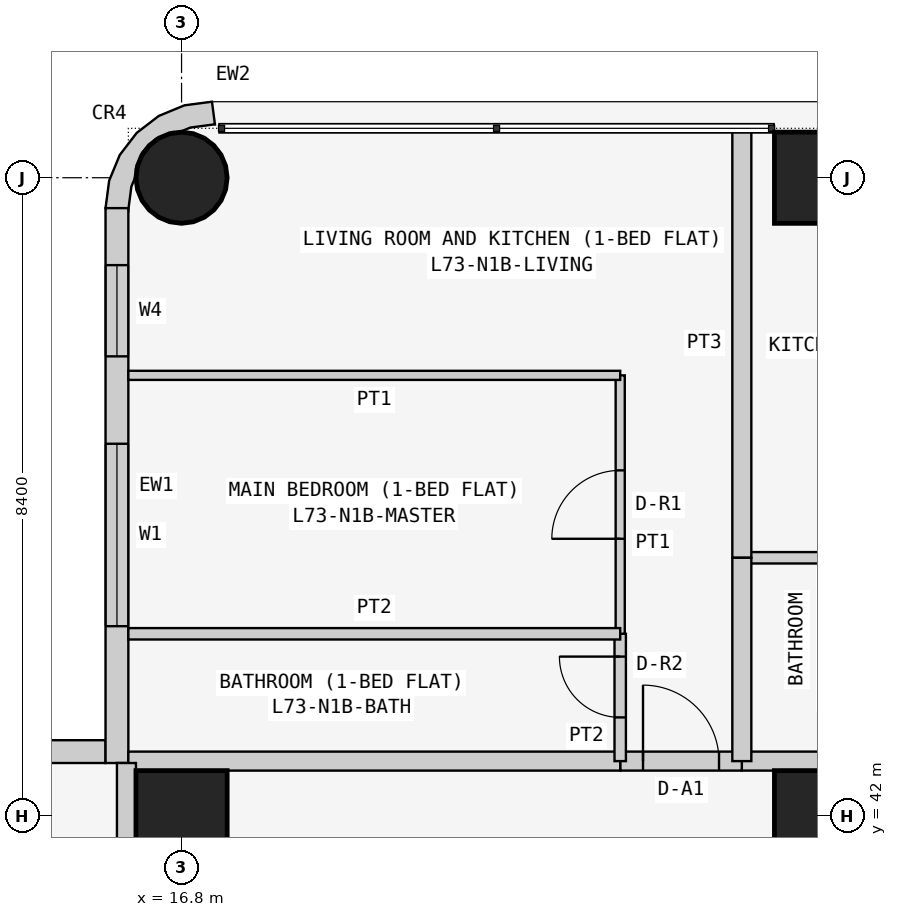
"""IFC4 building model, lengths in metres.
Left out: names, types, materials, properties, quantities, classifications, styles, units other than length and angle.
Written with IfcOpenShell. Run it as: python <this file> out.ifc"""

import sys

from ifc_helpers import new_model, si_unit, direction, frame, frame_2d, origin, origin_2d, place, context, subcontext, project, spatial, polyline, rectangle, circle, outline, extrude, element, fill, save


model = new_model("IFC4")
c1 = context("Model", 3, precision=1e-05, world=origin(), true_north=direction((0.0, 1.0)))
c2 = subcontext(c1, "Body", "Model", "MODEL_VIEW")
j1 = project(units=[si_unit("LENGTHUNIT", "METRE"), si_unit("PLANEANGLEUNIT", "RADIAN")], contexts=[c1])
p1 = place(None, origin())
s1 = spatial("IfcSite", under=j1, at=p1, CompositionType="ELEMENT")
p2 = place(p1, origin())
s2 = spatial("IfcBuilding", under=s1, at=p2, CompositionType="ELEMENT")
p3 = place(p2, frame((0.0, 0.0, 279.3)))
s3 = spatial("IfcBuildingStorey", under=s2, at=p3, CompositionType="ELEMENT", Elevation=279.3)
p4 = place(p3, frame((16.8, 42.0, 0.0), z_axis=(0.0, 0.0, 1.0), x_axis=(1.0, 0.0, 0.0)))
e1 = element("IfcColumn", 1, at=p4, inside=s3, PredefinedType="COLUMN", context=c2, shape_type="SweptSolid", body=[
    extrude(rectangle(XDim=1.2, YDim=1.2, at=origin_2d()), origin(), (0.0, 0.0, 1.0), 3.6),
])
p5 = place(p3, frame((16.8, 50.4, 0.0), z_axis=(0.0, 0.0, 1.0), x_axis=(1.0, 0.0, 0.0)))
e2 = element("IfcColumn", 2, at=p5, inside=s3, PredefinedType="COLUMN", context=c2, shape_type="SweptSolid", body=[
    extrude(circle(Radius=0.6, at=origin_2d()), origin(), (0.0, 0.0, 1.0), 3.6),
])
for number, where, z_axis, x_axis in (
    (3, (25.2, 42.0, 0.0), (0.0, 0.0, 1.0), (1.0, 0.0, 0.0)),
    (4, (25.2, 50.4, 0.0), (0.0, 0.0, 1.0), (1.0, 0.0, 0.0)),
):
    element("IfcColumn", number, at=place(p3, frame(where, z_axis=z_axis, x_axis=x_axis)), inside=s3, PredefinedType="COLUMN", context=c2, shape_type="SweptSolid", body=[
        extrude(rectangle(XDim=1.2, YDim=1.2, at=origin_2d()), origin(), (0.0, 0.0, 1.0), 3.6),
    ])
p6 = place(p3, frame((15.8, 42.85, 0.0), z_axis=(0.0, 0.0, 1.0), x_axis=(-1.0, 0.0, 0.0)))
e5 = element("IfcWall", 5, at=p6, inside=s3, PredefinedType="SOLIDWALL", context=c2, shape_type="SweptSolid", body=[
    extrude(rectangle(XDim=7.0, YDim=0.3, at=frame_2d((3.5, 0.0))), origin(), (0.0, 0.0, 1.0), 3.45),
])
p7 = place(p6, frame((1.5, 0.0, 0.9)))
e6 = element("IfcOpeningElement", 6, at=p7, cuts=e5, PredefinedType="OPENING", context=c2, shape_type="SweptSolid", body=[
    extrude(rectangle(XDim=2.4, YDim=1.5, at=frame_2d((1.2, 0.75))), frame((0.0, 0.16, 0.0), z_axis=(0.0, -1.0, 0.0), x_axis=(1.0, 0.0, 0.0)), (0.0, 0.0, 1.0), 0.32),
])
p8 = place(p6, frame((5.05, 0.0, 0.9)))
e7 = element("IfcOpeningElement", 7, at=p8, cuts=e5, PredefinedType="OPENING", context=c2, shape_type="SweptSolid", body=[
    extrude(rectangle(XDim=1.2, YDim=1.5, at=frame_2d((0.6, 0.75))), frame((0.0, 0.16, 0.0), z_axis=(0.0, -1.0, 0.0), x_axis=(1.0, 0.0, 0.0)), (0.0, 0.0, 1.0), 0.32),
])
p9 = place(p3, frame((15.95, 50.0, 0.0), z_axis=(0.0, 0.0, 1.0), x_axis=(0.0, -1.0, 0.0)))
e8 = element("IfcWall", 8, at=p9, inside=s3, PredefinedType="SOLIDWALL", context=c2, shape_type="SweptSolid", body=[
    extrude(rectangle(XDim=7.3, YDim=0.3, at=frame_2d((3.65, 0.0))), origin(), (0.0, 0.0, 1.0), 3.45),
])
p10 = place(p9, frame((3.1, 0.0, 0.9)))
e9 = element("IfcOpeningElement", 9, at=p10, cuts=e8, PredefinedType="OPENING", context=c2, shape_type="SweptSolid", body=[
    extrude(rectangle(XDim=2.4, YDim=1.5, at=frame_2d((1.2, 0.75))), frame((0.0, 0.16, 0.0), z_axis=(0.0, -1.0, 0.0), x_axis=(1.0, 0.0, 0.0)), (0.0, 0.0, 1.0), 0.32),
])
p11 = place(p9, frame((0.75, 0.0, 0.9)))
e10 = element("IfcOpeningElement", 10, at=p11, cuts=e8, PredefinedType="OPENING", context=c2, shape_type="SweptSolid", body=[
    extrude(rectangle(XDim=1.2, YDim=1.5, at=frame_2d((0.6, 0.75))), frame((0.0, 0.16, 0.0), z_axis=(0.0, -1.0, 0.0), x_axis=(1.0, 0.0, 0.0)), (0.0, 0.0, 1.0), 0.32),
])
p12 = place(p3, frame((17.162, 50.976, 0.0), z_axis=(0.0, 0.0, 1.0), x_axis=(-0.707106781187, 0.707106781187, 0.0)))
e11 = element("IfcWall", 11, at=p12, inside=s3, PredefinedType="SOLIDWALL", context=c2, shape_type="SweptSolid", body=[
    extrude(outline(polyline([(0.047, -0.129), (0.033, -0.143), (0.273, -0.327), (0.495, -0.037), (0.635, 0.301), (0.683, 0.663), (0.635, 1.025), (0.495, 1.363), (0.273, 1.653), (0.033, 1.469), (0.047, 1.455), (0.233, 1.212), (0.292, 1.069), (0.358, 1.003), (0.449, 0.782), (0.449, 0.543), (0.358, 0.322), (0.292, 0.257), (0.233, 0.114), (0.047, -0.129)])), origin(), (0.0, 0.0, 1.0), 3.45),
])
p13 = place(p3, frame((24.171, 42.725, 0.0), z_axis=(0.0, 0.0, 1.0), x_axis=(1.0, 0.0, 0.0)))
e12 = element("IfcWall", 12, at=p13, inside=s3, PredefinedType="PARTITIONING", context=c2, shape_type="SweptSolid", body=[
    extrude(rectangle(XDim=2.629, YDim=0.25, at=frame_2d((1.314, 0.0))), origin(), (0.0, 0.0, 1.0), 3.45),
])
p14 = place(p3, frame((22.571, 42.725, 0.0), z_axis=(0.0, 0.0, 1.0), x_axis=(1.0, 0.0, 0.0)))
e13 = element("IfcWall", 13, at=p14, inside=s3, PredefinedType="PARTITIONING", context=c2, shape_type="SweptSolid", body=[
    extrude(rectangle(XDim=1.6, YDim=0.25, at=frame_2d((0.8, 0.0))), origin(), (0.0, 0.0, 1.0), 3.45),
])
p15 = place(p14, frame((0.3, 0.0, 0.0)))
e14 = element("IfcOpeningElement", 14, at=p15, cuts=e13, PredefinedType="OPENING", context=c2, shape_type="SweptSolid", body=[
    extrude(rectangle(XDim=1.0, YDim=2.1, at=frame_2d((0.5, 1.05))), frame((0.0, 0.135, 0.0), z_axis=(0.0, -1.0, 0.0), x_axis=(1.0, 0.0, 0.0)), (0.0, 0.0, 1.0), 0.27),
])
p16 = place(p3, frame((16.1, 42.725, 0.0), z_axis=(0.0, 0.0, 1.0), x_axis=(1.0, 0.0, 0.0)))
e15 = element("IfcWall", 15, at=p16, inside=s3, PredefinedType="PARTITIONING", context=c2, shape_type="SweptSolid", body=[
    extrude(rectangle(XDim=6.471, YDim=0.25, at=frame_2d((3.235, 0.0))), origin(), (0.0, 0.0, 1.0), 3.45),
])
p17 = place(p3, frame((16.075, 35.829, 0.0), z_axis=(0.0, 0.0, 1.0), x_axis=(0.0, 1.0, 0.0)))
e16 = element("IfcWall", 16, at=p17, inside=s3, PredefinedType="PARTITIONING", context=c2, shape_type="SweptSolid", body=[
    extrude(rectangle(XDim=6.871, YDim=0.25, at=frame_2d((3.436, 0.0))), origin(), (0.0, 0.0, 1.0), 3.45),
])
p18 = place(p3, frame((26.8, 45.4, 0.0), z_axis=(0.0, 0.0, 1.0), x_axis=(-1.0, 0.0, 0.0)))
e17 = element("IfcWall", 17, at=p18, inside=s3, PredefinedType="PARTITIONING", context=c2, shape_type="SweptSolid", body=[
    extrude(rectangle(XDim=2.629, YDim=0.15, at=frame_2d((1.314, 0.0))), origin(), (0.0, 0.0, 1.0), 3.45),
])
p19 = place(p3, frame((24.171, 45.4, 0.0), z_axis=(0.0, 0.0, 1.0), x_axis=(0.0, 1.0, 0.0)))
e18 = element("IfcWall", 18, at=p19, inside=s3, PredefinedType="PARTITIONING", context=c2, shape_type="SweptSolid", body=[
    extrude(rectangle(XDim=5.65, YDim=0.25, at=frame_2d((2.825, 0.0))), origin(), (0.0, 0.0, 1.0), 3.45),
])
p20 = place(p3, frame((24.171, 45.4, 0.0), z_axis=(0.0, 0.0, 1.0), x_axis=(0.0, -1.0, 0.0)))
e19 = element("IfcWall", 19, at=p20, inside=s3, PredefinedType="PARTITIONING", context=c2, shape_type="SweptSolid", body=[
    extrude(rectangle(XDim=2.675, YDim=0.25, at=frame_2d((1.337, 0.0))), origin(), (0.0, 0.0, 1.0), 3.45),
])
p21 = place(p3, frame((22.571, 42.725, 0.0), z_axis=(0.0, 0.0, 1.0), x_axis=(0.0, 1.0, 0.0)))
e20 = element("IfcWall", 20, at=p21, inside=s3, PredefinedType="PARTITIONING", context=c2, shape_type="SweptSolid", body=[
    extrude(rectangle(XDim=1.675, YDim=0.15, at=frame_2d((0.837, 0.0))), origin(), (0.0, 0.0, 1.0), 3.45),
])
p22 = place(p21, frame((0.575, 0.0, 0.0)))
e21 = element("IfcOpeningElement", 21, at=p22, cuts=e20, PredefinedType="OPENING", context=c2, shape_type="SweptSolid", body=[
    extrude(rectangle(XDim=0.8, YDim=2.1, at=frame_2d((0.4, 1.05))), frame((0.0, 0.085, 0.0), z_axis=(0.0, -1.0, 0.0), x_axis=(1.0, 0.0, 0.0)), (0.0, 0.0, 1.0), 0.17),
])
p23 = place(p3, frame((22.571, 44.4, 0.0), z_axis=(0.0, 0.0, 1.0), x_axis=(0.0, 1.0, 0.0)))
e22 = element("IfcWall", 22, at=p23, inside=s3, PredefinedType="PARTITIONING", context=c2, shape_type="SweptSolid", body=[
    extrude(rectangle(XDim=3.4, YDim=0.12, at=frame_2d((1.7, 0.0))), origin(), (0.0, 0.0, 1.0), 3.45),
])
p24 = place(p23, frame((1.25, 0.0, 0.0)))
e23 = element("IfcOpeningElement", 23, at=p24, cuts=e22, PredefinedType="OPENING", context=c2, shape_type="SweptSolid", body=[
    extrude(rectangle(XDim=0.9, YDim=2.1, at=frame_2d((0.45, 1.05))), frame((0.0, 0.07, 0.0), z_axis=(0.0, -1.0, 0.0), x_axis=(1.0, 0.0, 0.0)), (0.0, 0.0, 1.0), 0.14),
])
p25 = place(p3, frame((22.571, 47.8, 0.0), z_axis=(0.0, 0.0, 1.0), x_axis=(-1.0, 0.0, 0.0)))
e24 = element("IfcWall", 24, at=p25, inside=s3, PredefinedType="PARTITIONING", context=c2, shape_type="SweptSolid", body=[
    extrude(rectangle(XDim=6.471, YDim=0.12, at=frame_2d((3.235, 0.0))), origin(), (0.0, 0.0, 1.0), 3.45),
])
p26 = place(p3, frame((22.571, 44.4, 0.0), z_axis=(0.0, 0.0, 1.0), x_axis=(-1.0, 0.0, 0.0)))
e25 = element("IfcWall", 25, at=p26, inside=s3, PredefinedType="PARTITIONING", context=c2, shape_type="SweptSolid", body=[
    extrude(rectangle(XDim=6.471, YDim=0.15, at=frame_2d((3.235, 0.0))), origin(), (0.0, 0.0, 1.0), 3.45),
])
p27 = place(p10, origin())
e26 = element("IfcWindow", 26, at=p27, inside=s3, PartitioningType="SINGLE_PANEL", PredefinedType="WINDOW", context=c2, shape_type="SweptSolid", body=[
    extrude(rectangle(XDim=2.4, YDim=1.5, at=frame_2d((1.2, 0.75))), frame((0.0, 0.03, 0.0), z_axis=(0.0, -1.0, 0.0), x_axis=(1.0, 0.0, 0.0)), (0.0, 0.0, 1.0), 0.06),
])
fill(e9, e26)
p28 = place(p11, origin())
e27 = element("IfcWindow", 27, at=p28, inside=s3, PartitioningType="SINGLE_PANEL", PredefinedType="WINDOW", context=c2, shape_type="SweptSolid", body=[
    extrude(rectangle(XDim=1.2, YDim=1.5, at=frame_2d((0.6, 0.75))), frame((0.0, 0.03, 0.0), z_axis=(0.0, -1.0, 0.0), x_axis=(1.0, 0.0, 0.0)), (0.0, 0.0, 1.0), 0.06),
])
fill(e10, e27)
p29 = place(p15, origin())
e28 = element("IfcDoor", 28, at=p29, inside=s3, OperationType="SINGLE_SWING_LEFT", PredefinedType="DOOR", context=c2, shape_type="SweptSolid", body=[
    extrude(rectangle(XDim=1.0, YDim=2.1, at=frame_2d((0.5, 1.05))), frame((0.0, 0.025, 0.0), z_axis=(0.0, -1.0, 0.0), x_axis=(1.0, 0.0, 0.0)), (0.0, 0.0, 1.0), 0.05),
])
fill(e14, e28)
p30 = place(p22, origin())
e29 = element("IfcDoor", 29, at=p30, inside=s3, OperationType="SINGLE_SWING_RIGHT", PredefinedType="DOOR", context=c2, shape_type="SweptSolid", body=[
    extrude(rectangle(XDim=0.8, YDim=2.1, at=frame_2d((0.4, 1.05))), frame((0.0, 0.025, 0.0), z_axis=(0.0, -1.0, 0.0), x_axis=(1.0, 0.0, 0.0)), (0.0, 0.0, 1.0), 0.05),
])
fill(e21, e29)
p31 = place(p24, origin())
e30 = element("IfcDoor", 30, at=p31, inside=s3, OperationType="SINGLE_SWING_LEFT", PredefinedType="DOOR", context=c2, shape_type="SweptSolid", body=[
    extrude(rectangle(XDim=0.9, YDim=2.1, at=frame_2d((0.45, 1.05))), frame((0.0, 0.025, 0.0), z_axis=(0.0, -1.0, 0.0), x_axis=(1.0, 0.0, 0.0)), (0.0, 0.0, 1.0), 0.05),
])
fill(e23, e30)
save(model, sys.argv[1])
